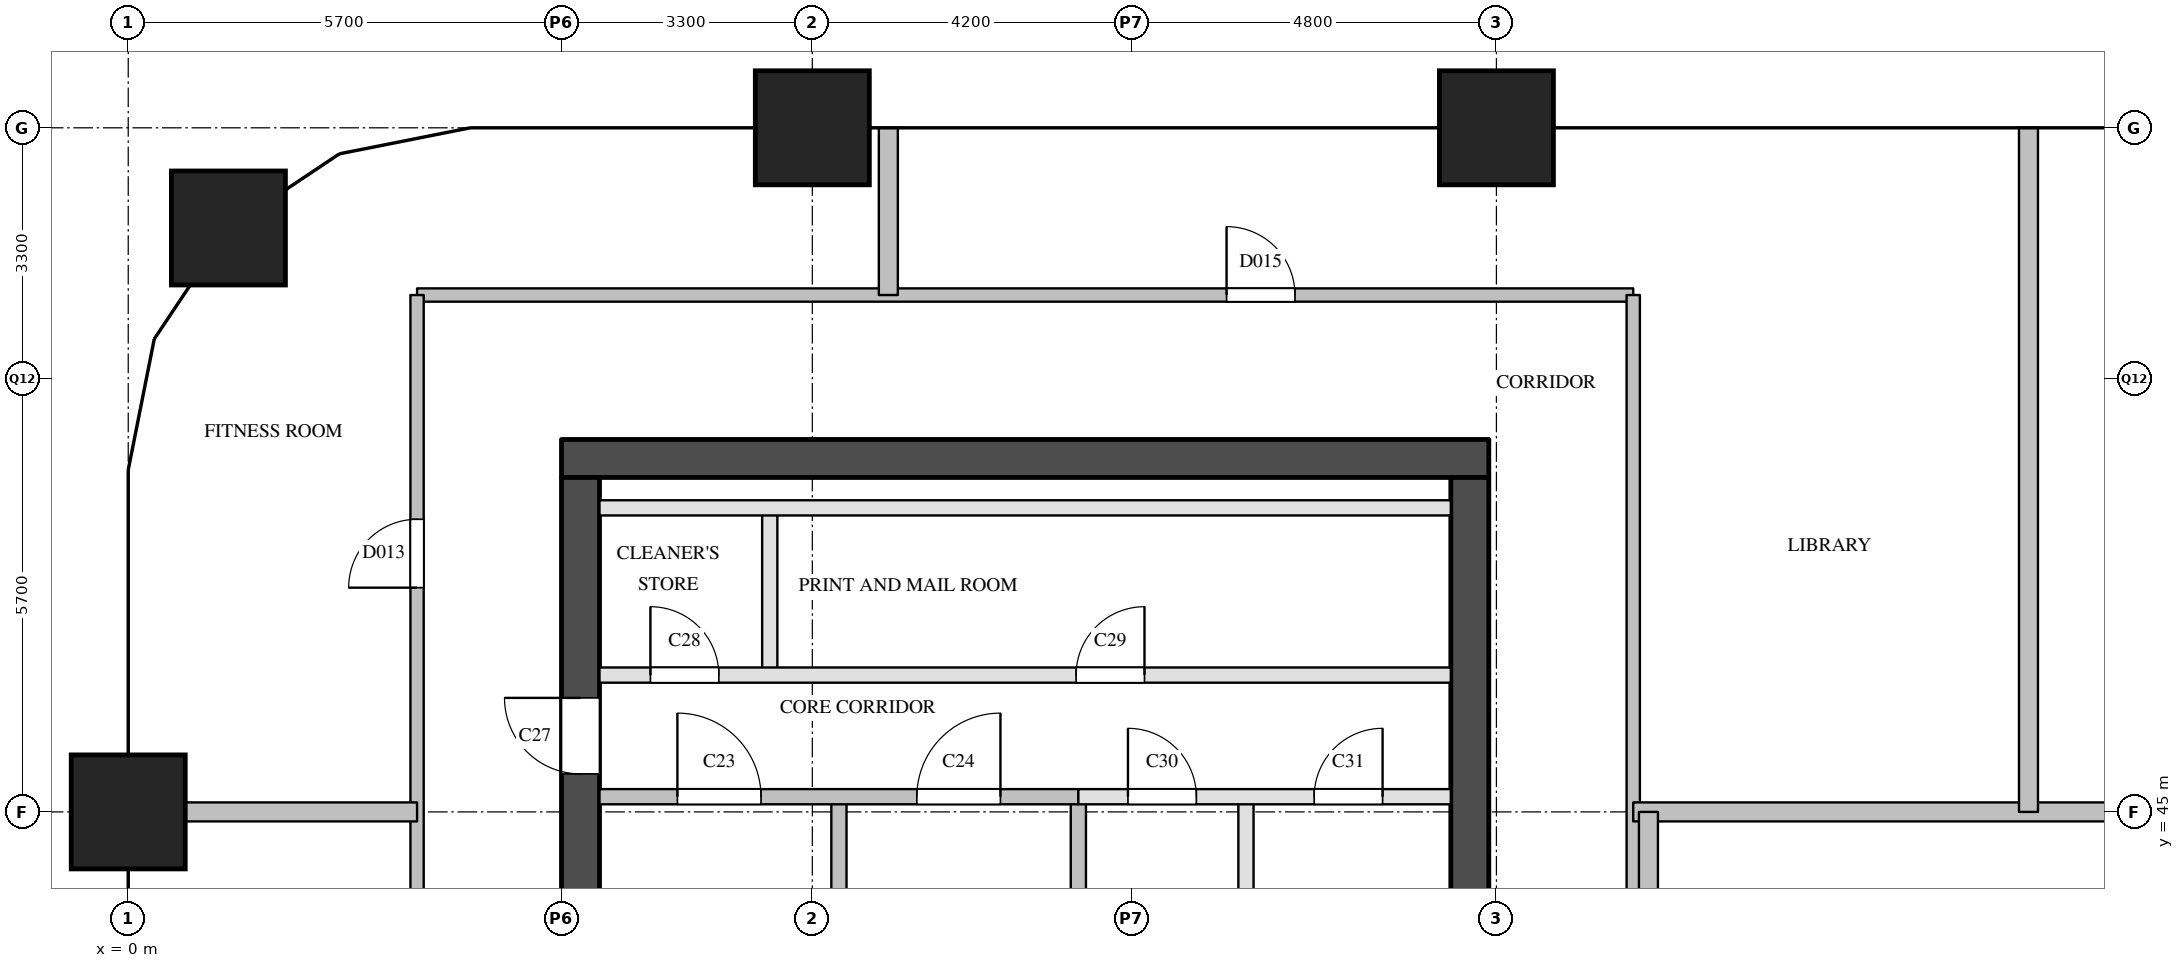
"""IFC4 building model, lengths in metres.
Left out: names, types, materials, properties, quantities, classifications, styles, units other than length and angle.
Written with IfcOpenShell. Run it as: python <this file> out.ifc"""

import sys

from ifc_helpers import new_model, si_unit, direction, frame, frame_2d, origin, origin_2d, place, context, subcontext, project, spatial, rectangle, extrude, element, fill, save


model = new_model("IFC4")
c1 = context("Model", 3, precision=1e-05, world=origin(), true_north=direction((0.0, 1.0)))
c2 = subcontext(c1, "Body", "Model", "MODEL_VIEW")
j1 = project(units=[si_unit("LENGTHUNIT", "METRE"), si_unit("PLANEANGLEUNIT", "RADIAN")], contexts=[c1])
p1 = place(None, origin())
s1 = spatial("IfcSite", under=j1, at=p1, CompositionType="ELEMENT")
p2 = place(p1, origin())
s2 = spatial("IfcBuilding", under=s1, at=p2, CompositionType="ELEMENT")
p3 = place(p2, frame((0.0, 0.0, 170.0)))
s3 = spatial("IfcBuildingStorey", under=s2, at=p3, CompositionType="ELEMENT", Elevation=170.0)
for number, where, z_axis, x_axis in (
    (1, (0.0, 45.0, 0.0), (0.0, 0.0, 1.0), (1.0, 0.0, 0.0)),
    (2, (1.318, 52.682, 0.0), (0.0, 0.0, 1.0), (1.0, 0.0, 0.0)),
    (3, (9.0, 54.0, 0.0), (0.0, 0.0, 1.0), (1.0, 0.0, 0.0)),
    (4, (18.0, 54.0, 0.0), (0.0, 0.0, 1.0), (1.0, 0.0, 0.0)),
):
    element("IfcColumn", number, at=place(p3, frame(where, z_axis=z_axis, x_axis=x_axis)), inside=s3, PredefinedType="COLUMN", context=c2, shape_type="SweptSolid", body=[
        extrude(rectangle(XDim=1.5, YDim=1.5, at=origin_2d()), origin(), (0.0, 0.0, 1.0), 3.9),
    ])
p4 = place(p3, frame((5.7, 49.65, 0.0), z_axis=(0.0, 0.0, 1.0), x_axis=(1.0, 0.0, 0.0)))
e5 = element("IfcWall", 5, at=p4, inside=s3, PredefinedType="SHEAR", context=c2, shape_type="SweptSolid", body=[
    extrude(rectangle(XDim=12.2, YDim=0.5, at=frame_2d((6.1, 0.0))), origin(), (0.0, 0.0, 1.0), 3.6),
])
p5 = place(p3, frame((5.95, 29.1, 0.0), z_axis=(0.0, 0.0, 1.0), x_axis=(0.0, 1.0, 0.0)))
e6 = element("IfcWall", 6, at=p5, inside=s3, PredefinedType="SHEAR", context=c2, shape_type="SweptSolid", body=[
    extrude(rectangle(XDim=20.3, YDim=0.5, at=frame_2d((10.15, 0.0))), origin(), (0.0, 0.0, 1.0), 3.6),
])
p6 = place(p5, frame((3.45, 0.0, 0.0)))
e7 = element("IfcOpeningElement", 7, at=p6, cuts=e6, PredefinedType="OPENING", context=c2, shape_type="SweptSolid", body=[
    extrude(rectangle(XDim=1.0, YDim=2.1, at=frame_2d((0.5, 1.05))), frame((0.0, 0.26, 0.0), z_axis=(0.0, -1.0, 0.0), x_axis=(1.0, 0.0, 0.0)), (0.0, 0.0, 1.0), 0.52),
])
p7 = place(p5, frame((16.4, 0.0, 0.0)))
e8 = element("IfcOpeningElement", 8, at=p7, cuts=e6, PredefinedType="OPENING", context=c2, shape_type="SweptSolid", body=[
    extrude(rectangle(XDim=1.0, YDim=2.1, at=frame_2d((0.5, 1.05))), frame((0.0, 0.26, 0.0), z_axis=(0.0, -1.0, 0.0), x_axis=(1.0, 0.0, 0.0)), (0.0, 0.0, 1.0), 0.52),
])
p8 = place(p3, frame((17.65, 29.1, 0.0), z_axis=(0.0, 0.0, 1.0), x_axis=(0.0, 1.0, 0.0)))
e9 = element("IfcWall", 9, at=p8, inside=s3, PredefinedType="SHEAR", context=c2, shape_type="SweptSolid", body=[
    extrude(rectangle(XDim=20.3, YDim=0.5, at=frame_2d((10.15, 0.0))), origin(), (0.0, 0.0, 1.0), 3.6),
])
p9 = place(p8, frame((1.25, 0.0, 0.0)))
e10 = element("IfcOpeningElement", 10, at=p9, cuts=e9, PredefinedType="OPENING", context=c2, shape_type="SweptSolid", body=[
    extrude(rectangle(XDim=0.7, YDim=2.1, at=frame_2d((0.35, 1.05))), frame((0.0, 0.26, 0.0), z_axis=(0.0, -1.0, 0.0), x_axis=(1.0, 0.0, 0.0)), (0.0, 0.0, 1.0), 0.52),
])
p10 = place(p8, frame((7.05, 0.0, 0.0)))
e11 = element("IfcOpeningElement", 11, at=p10, cuts=e9, PredefinedType="OPENING", context=c2, shape_type="SweptSolid", body=[
    extrude(rectangle(XDim=0.7, YDim=2.1, at=frame_2d((0.35, 1.05))), frame((0.0, 0.26, 0.0), z_axis=(0.0, -1.0, 0.0), x_axis=(1.0, 0.0, 0.0)), (0.0, 0.0, 1.0), 0.52),
])
p11 = place(p8, frame((3.6, 0.0, 0.0)))
e12 = element("IfcOpeningElement", 12, at=p11, cuts=e9, PredefinedType="OPENING", context=c2, shape_type="SweptSolid", body=[
    extrude(rectangle(XDim=1.8, YDim=2.1, at=frame_2d((0.9, 1.05))), frame((0.0, 0.26, 0.0), z_axis=(0.0, -1.0, 0.0), x_axis=(1.0, 0.0, 0.0)), (0.0, 0.0, 1.0), 0.52),
])
p12 = place(p3, frame((8.44, 46.8, 0.0), z_axis=(0.0, 0.0, 1.0), x_axis=(0.0, 1.0, 0.0)))
e13 = element("IfcWall", 13, at=p12, inside=s3, PredefinedType="PARTITIONING", context=c2, shape_type="SweptSolid", body=[
    extrude(rectangle(XDim=2.2, YDim=0.2, at=frame_2d((1.1, 0.0))), origin(), (0.0, 0.0, 1.0), 3.6),
])
for number, where, z_axis, x_axis in (
    (14, (9.35, 40.9, 0.0), (0.0, 0.0, 1.0), (0.0, 1.0, 0.0)),
    (15, (12.5, 40.9, 0.0), (0.0, 0.0, 1.0), (0.0, 1.0, 0.0)),
):
    element("IfcWall", number, at=place(p3, frame(where, z_axis=z_axis, x_axis=x_axis)), inside=s3, PredefinedType="SOLIDWALL", context=c2, shape_type="SweptSolid", body=[
        extrude(rectangle(XDim=4.3, YDim=0.2, at=frame_2d((2.15, 0.0))), origin(), (0.0, 0.0, 1.0), 3.6),
    ])
p13 = place(p3, frame((14.705, 39.0, 0.0), z_axis=(0.0, 0.0, 1.0), x_axis=(0.0, 1.0, 0.0)))
e16 = element("IfcWall", 16, at=p13, inside=s3, PredefinedType="PARTITIONING", context=c2, shape_type="SweptSolid", body=[
    extrude(rectangle(XDim=6.2, YDim=0.2, at=frame_2d((3.1, 0.0))), origin(), (0.0, 0.0, 1.0), 3.6),
])
p14 = place(p3, frame((12.5, 45.2, 0.0), z_axis=(0.0, 0.0, 1.0), x_axis=(1.0, 0.0, 0.0)))
e17 = element("IfcWall", 17, at=p14, inside=s3, PredefinedType="PARTITIONING", context=c2, shape_type="SweptSolid", body=[
    extrude(rectangle(XDim=4.9, YDim=0.2, at=frame_2d((2.45, 0.0))), origin(), (0.0, 0.0, 1.0), 3.6),
])
p15 = place(p14, frame((0.653, 0.0, 0.0)))
e18 = element("IfcOpeningElement", 18, at=p15, cuts=e17, PredefinedType="OPENING", context=c2, shape_type="SweptSolid", body=[
    extrude(rectangle(XDim=0.9, YDim=2.1, at=frame_2d((0.45, 1.05))), frame((0.0, 0.11, 0.0), z_axis=(0.0, -1.0, 0.0), x_axis=(1.0, 0.0, 0.0)), (0.0, 0.0, 1.0), 0.22),
])
p16 = place(p14, frame((3.103, 0.0, 0.0)))
e19 = element("IfcOpeningElement", 19, at=p16, cuts=e17, PredefinedType="OPENING", context=c2, shape_type="SweptSolid", body=[
    extrude(rectangle(XDim=0.9, YDim=2.1, at=frame_2d((0.45, 1.05))), frame((0.0, 0.11, 0.0), z_axis=(0.0, -1.0, 0.0), x_axis=(1.0, 0.0, 0.0)), (0.0, 0.0, 1.0), 0.22),
])
p17 = place(p3, frame((6.2, 45.2, 0.0), z_axis=(0.0, 0.0, 1.0), x_axis=(1.0, 0.0, 0.0)))
e20 = element("IfcWall", 20, at=p17, inside=s3, PredefinedType="SOLIDWALL", context=c2, shape_type="SweptSolid", body=[
    extrude(rectangle(XDim=6.3, YDim=0.2, at=frame_2d((3.15, 0.0))), origin(), (0.0, 0.0, 1.0), 3.6),
])
p18 = place(p17, frame((1.025, 0.0, 0.0)))
e21 = element("IfcOpeningElement", 21, at=p18, cuts=e20, PredefinedType="OPENING", context=c2, shape_type="SweptSolid", body=[
    extrude(rectangle(XDim=1.1, YDim=2.1, at=frame_2d((0.55, 1.05))), frame((0.0, 0.11, 0.0), z_axis=(0.0, -1.0, 0.0), x_axis=(1.0, 0.0, 0.0)), (0.0, 0.0, 1.0), 0.22),
])
p19 = place(p17, frame((4.175, 0.0, 0.0)))
e22 = element("IfcOpeningElement", 22, at=p19, cuts=e20, PredefinedType="OPENING", context=c2, shape_type="SweptSolid", body=[
    extrude(rectangle(XDim=1.1, YDim=2.1, at=frame_2d((0.55, 1.05))), frame((0.0, 0.11, 0.0), z_axis=(0.0, -1.0, 0.0), x_axis=(1.0, 0.0, 0.0)), (0.0, 0.0, 1.0), 0.22),
])
p20 = place(p3, frame((6.2, 46.8, 0.0), z_axis=(0.0, 0.0, 1.0), x_axis=(1.0, 0.0, 0.0)))
e23 = element("IfcWall", 23, at=p20, inside=s3, PredefinedType="PARTITIONING", context=c2, shape_type="SweptSolid", body=[
    extrude(rectangle(XDim=11.2, YDim=0.2, at=frame_2d((5.6, 0.0))), origin(), (0.0, 0.0, 1.0), 3.6),
])
p21 = place(p20, frame((0.67, 0.0, 0.0)))
e24 = element("IfcOpeningElement", 24, at=p21, cuts=e23, PredefinedType="OPENING", context=c2, shape_type="SweptSolid", body=[
    extrude(rectangle(XDim=0.9, YDim=2.1, at=frame_2d((0.45, 1.05))), frame((0.0, 0.11, 0.0), z_axis=(0.0, -1.0, 0.0), x_axis=(1.0, 0.0, 0.0)), (0.0, 0.0, 1.0), 0.22),
])
p22 = place(p20, frame((6.27, 0.0, 0.0)))
e25 = element("IfcOpeningElement", 25, at=p22, cuts=e23, PredefinedType="OPENING", context=c2, shape_type="SweptSolid", body=[
    extrude(rectangle(XDim=0.9, YDim=2.1, at=frame_2d((0.45, 1.05))), frame((0.0, 0.11, 0.0), z_axis=(0.0, -1.0, 0.0), x_axis=(1.0, 0.0, 0.0)), (0.0, 0.0, 1.0), 0.22),
])
p23 = place(p3, frame((6.2, 49.0, 0.0), z_axis=(0.0, 0.0, 1.0), x_axis=(1.0, 0.0, 0.0)))
e26 = element("IfcWall", 26, at=p23, inside=s3, PredefinedType="PARTITIONING", context=c2, shape_type="SweptSolid", body=[
    extrude(rectangle(XDim=11.2, YDim=0.2, at=frame_2d((5.6, 0.0))), origin(), (0.0, 0.0, 1.0), 3.6),
])
p24 = place(p3, frame((3.8, 51.8, 0.0), z_axis=(0.0, 0.0, 1.0), x_axis=(1.0, 0.0, 0.0)))
e27 = element("IfcWall", 27, at=p24, inside=s3, PredefinedType="PARTITIONING", context=c2, shape_type="SweptSolid", body=[
    extrude(rectangle(XDim=16.0, YDim=0.175, at=frame_2d((8.0, 0.0))), origin(), (0.0, 0.0, 1.0), 3.6),
])
p25 = place(p24, frame((10.65, 0.0, 0.0)))
e28 = element("IfcOpeningElement", 28, at=p25, cuts=e27, PredefinedType="OPENING", context=c2, shape_type="SweptSolid", body=[
    extrude(rectangle(XDim=0.9, YDim=2.1, at=frame_2d((0.45, 1.05))), frame((0.0, 0.097, 0.0), z_axis=(0.0, -1.0, 0.0), x_axis=(1.0, 0.0, 0.0)), (0.0, 0.0, 1.0), 0.195),
])
p26 = place(p3, frame((3.8, 28.5, 0.0), z_axis=(0.0, 0.0, 1.0), x_axis=(0.0, 1.0, 0.0)))
e29 = element("IfcWall", 29, at=p26, inside=s3, PredefinedType="PARTITIONING", context=c2, shape_type="SweptSolid", body=[
    extrude(rectangle(XDim=23.3, YDim=0.175, at=frame_2d((11.65, 0.0))), origin(), (0.0, 0.0, 1.0), 3.6),
])
p27 = place(p26, frame((7.8, 0.0, 0.0)))
e30 = element("IfcOpeningElement", 30, at=p27, cuts=e29, PredefinedType="OPENING", context=c2, shape_type="SweptSolid", body=[
    extrude(rectangle(XDim=0.9, YDim=2.1, at=frame_2d((0.45, 1.05))), frame((0.0, 0.097, 0.0), z_axis=(0.0, -1.0, 0.0), x_axis=(1.0, 0.0, 0.0)), (0.0, 0.0, 1.0), 0.195),
])
p28 = place(p26, frame((19.45, 0.0, 0.0)))
e31 = element("IfcOpeningElement", 31, at=p28, cuts=e29, PredefinedType="OPENING", context=c2, shape_type="SweptSolid", body=[
    extrude(rectangle(XDim=0.9, YDim=2.1, at=frame_2d((0.45, 1.05))), frame((0.0, 0.097, 0.0), z_axis=(0.0, -1.0, 0.0), x_axis=(1.0, 0.0, 0.0)), (0.0, 0.0, 1.0), 0.195),
])
p29 = place(p3, frame((19.8, 28.5, 0.0), z_axis=(0.0, 0.0, 1.0), x_axis=(0.0, 1.0, 0.0)))
e32 = element("IfcWall", 32, at=p29, inside=s3, PredefinedType="PARTITIONING", context=c2, shape_type="SweptSolid", body=[
    extrude(rectangle(XDim=23.3, YDim=0.175, at=frame_2d((11.65, 0.0))), origin(), (0.0, 0.0, 1.0), 3.6),
])
p30 = place(p3, frame((0.0, 45.0, 0.0), z_axis=(0.0, 0.0, 1.0), x_axis=(1.0, 0.0, 0.0)))
e33 = element("IfcWall", 33, at=p30, inside=s3, PredefinedType="PARTITIONING", context=c2, shape_type="SweptSolid", body=[
    extrude(rectangle(XDim=3.8, YDim=0.25, at=frame_2d((1.9, 0.0))), origin(), (0.0, 0.0, 1.0), 3.6),
])
p31 = place(p3, frame((19.8, 45.0, 0.0), z_axis=(0.0, 0.0, 1.0), x_axis=(1.0, 0.0, 0.0)))
e34 = element("IfcWall", 34, at=p31, inside=s3, PredefinedType="PARTITIONING", context=c2, shape_type="SweptSolid", body=[
    extrude(rectangle(XDim=14.4, YDim=0.25, at=frame_2d((7.2, 0.0))), origin(), (0.0, 0.0, 1.0), 3.6),
])
p32 = place(p3, frame((10.0, 51.8, 0.0), z_axis=(0.0, 0.0, 1.0), x_axis=(0.0, 1.0, 0.0)))
e35 = element("IfcWall", 35, at=p32, inside=s3, PredefinedType="PARTITIONING", context=c2, shape_type="SweptSolid", body=[
    extrude(rectangle(XDim=2.2, YDim=0.25, at=frame_2d((1.1, 0.0))), origin(), (0.0, 0.0, 1.0), 2.6),
])
p33 = place(p3, frame((20.0, 27.0, 0.0), z_axis=(0.0, 0.0, 1.0), x_axis=(0.0, 1.0, 0.0)))
e36 = element("IfcWall", 36, at=p33, inside=s3, PredefinedType="PARTITIONING", context=c2, shape_type="SweptSolid", body=[
    extrude(rectangle(XDim=18.0, YDim=0.25, at=frame_2d((9.0, 0.0))), origin(), (0.0, 0.0, 1.0), 2.6),
])
p34 = place(p3, frame((25.0, 45.0, 0.0), z_axis=(0.0, 0.0, 1.0), x_axis=(0.0, 1.0, 0.0)))
e37 = element("IfcWall", 37, at=p34, inside=s3, PredefinedType="PARTITIONING", context=c2, shape_type="SweptSolid", body=[
    extrude(rectangle(XDim=9.0, YDim=0.25, at=frame_2d((4.5, 0.0))), origin(), (0.0, 0.0, 1.0), 2.6),
])
p35 = place(p18, origin())
e38 = element("IfcDoor", 38, at=p35, inside=s3, OperationType="SINGLE_SWING_LEFT", PredefinedType="DOOR", context=c2, shape_type="SweptSolid", body=[
    extrude(rectangle(XDim=1.1, YDim=2.1, at=frame_2d((0.55, 1.05))), frame((0.0, 0.025, 0.0), z_axis=(0.0, -1.0, 0.0), x_axis=(1.0, 0.0, 0.0)), (0.0, 0.0, 1.0), 0.05),
])
fill(e21, e38)
p36 = place(p19, origin())
e39 = element("IfcDoor", 39, at=p36, inside=s3, OperationType="SINGLE_SWING_RIGHT", PredefinedType="DOOR", context=c2, shape_type="SweptSolid", body=[
    extrude(rectangle(XDim=1.1, YDim=2.1, at=frame_2d((0.55, 1.05))), frame((0.0, 0.025, 0.0), z_axis=(0.0, -1.0, 0.0), x_axis=(1.0, 0.0, 0.0)), (0.0, 0.0, 1.0), 0.05),
])
fill(e22, e39)
p37 = place(p7, origin())
e40 = element("IfcDoor", 40, at=p37, inside=s3, OperationType="SINGLE_SWING_RIGHT", PredefinedType="DOOR", context=c2, shape_type="SweptSolid", body=[
    extrude(rectangle(XDim=1.0, YDim=2.1, at=frame_2d((0.5, 1.05))), frame((0.0, 0.025, 0.0), z_axis=(0.0, -1.0, 0.0), x_axis=(1.0, 0.0, 0.0)), (0.0, 0.0, 1.0), 0.05),
])
fill(e8, e40)
p38 = place(p21, origin())
e41 = element("IfcDoor", 41, at=p38, inside=s3, OperationType="SINGLE_SWING_LEFT", PredefinedType="DOOR", context=c2, shape_type="SweptSolid", body=[
    extrude(rectangle(XDim=0.9, YDim=2.1, at=frame_2d((0.45, 1.05))), frame((0.0, 0.025, 0.0), z_axis=(0.0, -1.0, 0.0), x_axis=(1.0, 0.0, 0.0)), (0.0, 0.0, 1.0), 0.05),
])
fill(e24, e41)
p39 = place(p22, origin())
e42 = element("IfcDoor", 42, at=p39, inside=s3, OperationType="SINGLE_SWING_RIGHT", PredefinedType="DOOR", context=c2, shape_type="SweptSolid", body=[
    extrude(rectangle(XDim=0.9, YDim=2.1, at=frame_2d((0.45, 1.05))), frame((0.0, 0.025, 0.0), z_axis=(0.0, -1.0, 0.0), x_axis=(1.0, 0.0, 0.0)), (0.0, 0.0, 1.0), 0.05),
])
fill(e25, e42)
p40 = place(p15, origin())
e43 = element("IfcDoor", 43, at=p40, inside=s3, OperationType="SINGLE_SWING_LEFT", PredefinedType="DOOR", context=c2, shape_type="SweptSolid", body=[
    extrude(rectangle(XDim=0.9, YDim=2.1, at=frame_2d((0.45, 1.05))), frame((0.0, 0.025, 0.0), z_axis=(0.0, -1.0, 0.0), x_axis=(1.0, 0.0, 0.0)), (0.0, 0.0, 1.0), 0.05),
])
fill(e18, e43)
p41 = place(p16, origin())
e44 = element("IfcDoor", 44, at=p41, inside=s3, OperationType="SINGLE_SWING_RIGHT", PredefinedType="DOOR", context=c2, shape_type="SweptSolid", body=[
    extrude(rectangle(XDim=0.9, YDim=2.1, at=frame_2d((0.45, 1.05))), frame((0.0, 0.025, 0.0), z_axis=(0.0, -1.0, 0.0), x_axis=(1.0, 0.0, 0.0)), (0.0, 0.0, 1.0), 0.05),
])
fill(e19, e44)
p42 = place(p28, origin())
e45 = element("IfcDoor", 45, at=p42, inside=s3, OperationType="SINGLE_SWING_LEFT", PredefinedType="DOOR", context=c2, shape_type="SweptSolid", body=[
    extrude(rectangle(XDim=0.9, YDim=2.1, at=frame_2d((0.45, 1.05))), frame((0.0, 0.025, 0.0), z_axis=(0.0, -1.0, 0.0), x_axis=(1.0, 0.0, 0.0)), (0.0, 0.0, 1.0), 0.05),
])
fill(e31, e45)
p43 = place(p25, origin())
e46 = element("IfcDoor", 46, at=p43, inside=s3, OperationType="SINGLE_SWING_LEFT", PredefinedType="DOOR", context=c2, shape_type="SweptSolid", body=[
    extrude(rectangle(XDim=0.9, YDim=2.1, at=frame_2d((0.45, 1.05))), frame((0.0, 0.025, 0.0), z_axis=(0.0, -1.0, 0.0), x_axis=(1.0, 0.0, 0.0)), (0.0, 0.0, 1.0), 0.05),
])
fill(e28, e46)
save(model, sys.argv[1])
